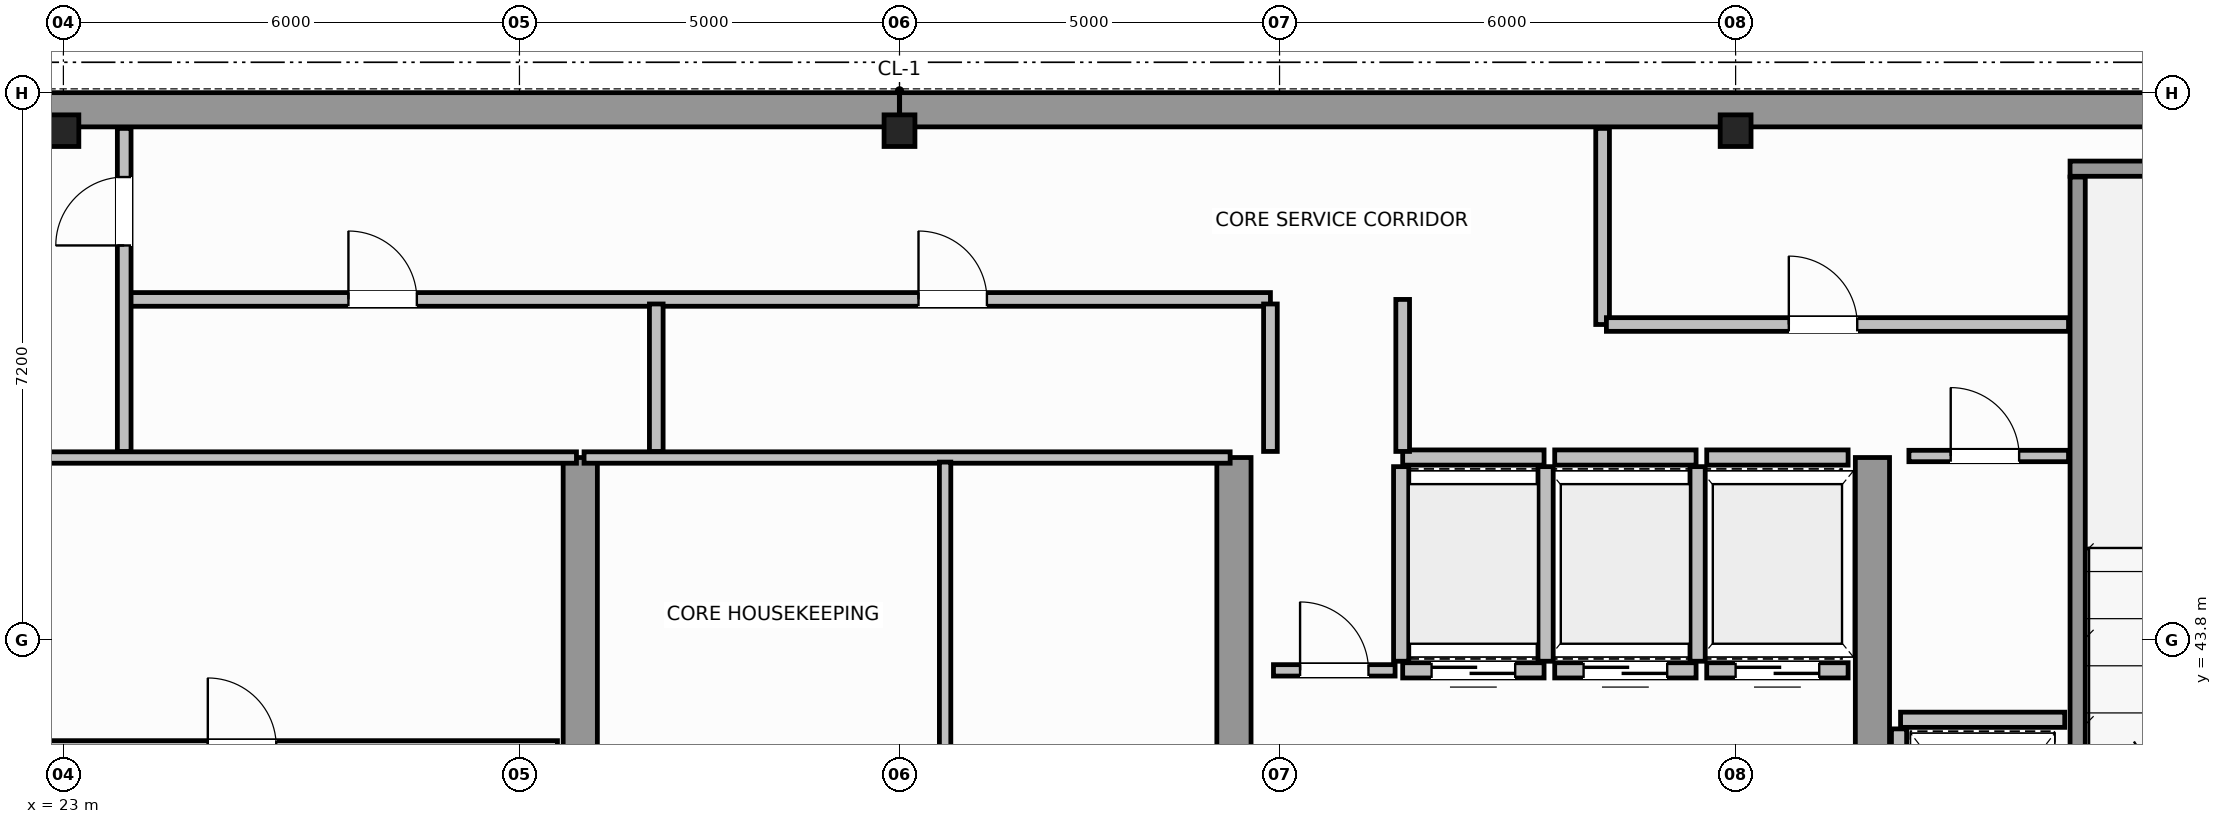
"""IFC4 building model, lengths in metres.
Left out: names, types, materials, properties, quantities, classifications, styles, units other than length and angle.
Written with IfcOpenShell. Run it as: python <this file> out.ifc"""

import sys

from ifc_helpers import new_model, si_unit, direction, frame, frame_2d, origin, origin_2d, place, context, subcontext, project, spatial, rectangle, i_section, extrude, source, transform, mapped, element, fill, save


model = new_model("IFC4")
c1 = context("Model", 3, precision=1e-05, world=origin(), true_north=direction((0.0, 1.0)))
c2 = subcontext(c1, "Body", "Model", "MODEL_VIEW")
j1 = project(units=[si_unit("LENGTHUNIT", "METRE"), si_unit("PLANEANGLEUNIT", "RADIAN")], contexts=[c1])
p1 = place(None, origin())
s1 = spatial("IfcSite", under=j1, at=p1, CompositionType="ELEMENT")
p2 = place(p1, origin())
s2 = spatial("IfcBuilding", under=s1, at=p2, CompositionType="ELEMENT")
p3 = place(p2, frame((0.0, 0.0, 276.4)))
s3 = spatial("IfcBuildingStorey", under=s2, at=p3, CompositionType="ELEMENT", Elevation=276.4)
m1 = source(origin(), c2, "Body", "SweptSolid", [
    extrude(i_section(OverallWidth=0.406, OverallDepth=0.416, WebThickness=0.03, FlangeThickness=0.042, FilletRadius=0.015, at=origin_2d()), origin(), (0.0, 0.0, 1.0), 3.8),
])
for number, where, z_axis, x_axis in (
    (1, (23.0, 50.5, 0.0), (0.0, 0.0, 1.0), (1.0, 0.0, 0.0)),
    (2, (34.0, 50.5, 0.0), (0.0, 0.0, 1.0), (1.0, 0.0, 0.0)),
    (3, (45.0, 50.5, 0.0), (0.0, 0.0, 1.0), (1.0, 0.0, 0.0)),
):
    element("IfcColumn", number, at=place(p3, frame(where, z_axis=z_axis, x_axis=x_axis)), inside=s3, PredefinedType="COLUMN", context=c2, shape_type="MappedRepresentation", body=[
        mapped(m1, transform((0.0, 0.0, 0.0), scale=1.0)),
    ])
for number, where, z_axis, x_axis in (
    (4, (14.229, 50.775, 0.0), (0.0, 0.0, 1.0), (1.0, 0.0, 0.0)),
    (5, (34.002, 50.775, 0.0), (0.0, 0.0, 1.0), (1.0, 0.0, 0.0)),
):
    element("IfcWall", number, at=place(p3, frame(where, z_axis=z_axis, x_axis=x_axis)), inside=s3, PredefinedType="SHEAR", context=c2, shape_type="SweptSolid", body=[
        extrude(rectangle(XDim=19.769, YDim=0.45, at=frame_2d((9.885, 0.0))), origin(), (0.0, 0.0, 1.0), 3.8),
    ])
for number, where, z_axis, x_axis in (
    (6, (29.8, 36.745, 0.0), (0.0, 0.0, 1.0), (0.0, 1.0, 0.0)),
    (7, (38.4, 36.745, 0.0), (0.0, 0.0, 1.0), (0.0, 1.0, 0.0)),
    (8, (46.8, 36.745, 0.0), (0.0, 0.0, 1.0), (0.0, 1.0, 0.0)),
):
    element("IfcWall", number, at=place(p3, frame(where, z_axis=z_axis, x_axis=x_axis)), inside=s3, PredefinedType="SHEAR", context=c2, shape_type="SweptSolid", body=[
        extrude(rectangle(XDim=9.455, YDim=0.45, at=frame_2d((4.728, 0.0))), origin(), (0.0, 0.0, 1.0), 3.8),
    ])
p4 = place(p3, frame((49.4, 50.0, 0.0), z_axis=(0.0, 0.0, 1.0), x_axis=(1.0, 0.0, 0.0)))
e9 = element("IfcWall", 9, at=p4, inside=s3, PredefinedType="SOLIDWALL", context=c2, shape_type="SweptSolid", body=[
    extrude(rectangle(XDim=4.375, YDim=0.2, at=frame_2d((2.188, 0.0))), origin(), (0.0, 0.0, 1.0), 3.8),
])
p5 = place(p3, frame((49.5, 39.96, 0.0), z_axis=(0.0, 0.0, 1.0), x_axis=(0.0, 1.0, 0.0)))
e10 = element("IfcWall", 10, at=p5, inside=s3, PredefinedType="SOLIDWALL", context=c2, shape_type="SweptSolid", body=[
    extrude(rectangle(XDim=9.93, YDim=0.2, at=frame_2d((4.965, 0.0))), origin(), (0.0, 0.0, 1.0), 3.8),
])
p6 = place(p3, frame((40.62, 43.4, 0.0), z_axis=(0.0, 0.0, 1.0), x_axis=(1.0, 0.0, 0.0)))
e11 = element("IfcWall", 11, at=p6, inside=s3, PredefinedType="SOLIDWALL", context=c2, shape_type="SweptSolid", body=[
    extrude(rectangle(XDim=1.86, YDim=0.2, at=frame_2d((0.93, 0.0))), origin(), (0.0, 0.0, 1.0), 3.58),
])
p7 = place(p6, frame((0.38, 0.0, 0.0)))
e12 = element("IfcOpeningElement", 12, at=p7, cuts=e11, PredefinedType="OPENING", context=c2, shape_type="SweptSolid", body=[
    extrude(rectangle(XDim=1.1, YDim=2.15, at=frame_2d((0.55, 1.075))), frame((0.0, 0.11, 0.0), z_axis=(0.0, -1.0, 0.0), x_axis=(1.0, 0.0, 0.0)), (0.0, 0.0, 1.0), 0.22),
])
p8 = place(p3, frame((40.62, 46.2, 0.0), z_axis=(0.0, 0.0, 1.0), x_axis=(1.0, 0.0, 0.0)))
e13 = element("IfcWall", 13, at=p8, inside=s3, PredefinedType="SOLIDWALL", context=c2, shape_type="SweptSolid", body=[
    extrude(rectangle(XDim=1.86, YDim=0.2, at=frame_2d((0.93, 0.0))), origin(), (0.0, 0.0, 1.0), 3.58),
])
for number, where, z_axis, x_axis in (
    (14, (40.6, 43.52, 0.0), (0.0, 0.0, 1.0), (0.0, 1.0, 0.0)),
    (15, (42.5, 43.52, 0.0), (0.0, 0.0, 1.0), (0.0, 1.0, 0.0)),
):
    element("IfcWall", number, at=place(p3, frame(where, z_axis=z_axis, x_axis=x_axis)), inside=s3, PredefinedType="SOLIDWALL", context=c2, shape_type="SweptSolid", body=[
        extrude(rectangle(XDim=2.56, YDim=0.2, at=frame_2d((1.28, 0.0))), origin(), (0.0, 0.0, 1.0), 3.58),
    ])
p9 = place(p3, frame((42.62, 43.4, 0.0), z_axis=(0.0, 0.0, 1.0), x_axis=(1.0, 0.0, 0.0)))
e16 = element("IfcWall", 16, at=p9, inside=s3, PredefinedType="SOLIDWALL", context=c2, shape_type="SweptSolid", body=[
    extrude(rectangle(XDim=1.86, YDim=0.2, at=frame_2d((0.93, 0.0))), origin(), (0.0, 0.0, 1.0), 3.58),
])
p10 = place(p9, frame((0.38, 0.0, 0.0)))
e17 = element("IfcOpeningElement", 17, at=p10, cuts=e16, PredefinedType="OPENING", context=c2, shape_type="SweptSolid", body=[
    extrude(rectangle(XDim=1.1, YDim=2.15, at=frame_2d((0.55, 1.075))), frame((0.0, 0.11, 0.0), z_axis=(0.0, -1.0, 0.0), x_axis=(1.0, 0.0, 0.0)), (0.0, 0.0, 1.0), 0.22),
])
p11 = place(p3, frame((42.62, 46.2, 0.0), z_axis=(0.0, 0.0, 1.0), x_axis=(1.0, 0.0, 0.0)))
e18 = element("IfcWall", 18, at=p11, inside=s3, PredefinedType="SOLIDWALL", context=c2, shape_type="SweptSolid", body=[
    extrude(rectangle(XDim=1.86, YDim=0.2, at=frame_2d((0.93, 0.0))), origin(), (0.0, 0.0, 1.0), 3.58),
])
p12 = place(p3, frame((44.5, 43.52, 0.0), z_axis=(0.0, 0.0, 1.0), x_axis=(0.0, 1.0, 0.0)))
e19 = element("IfcWall", 19, at=p12, inside=s3, PredefinedType="SOLIDWALL", context=c2, shape_type="SweptSolid", body=[
    extrude(rectangle(XDim=2.56, YDim=0.2, at=frame_2d((1.28, 0.0))), origin(), (0.0, 0.0, 1.0), 3.58),
])
p13 = place(p3, frame((44.62, 43.4, 0.0), z_axis=(0.0, 0.0, 1.0), x_axis=(1.0, 0.0, 0.0)))
e20 = element("IfcWall", 20, at=p13, inside=s3, PredefinedType="SOLIDWALL", context=c2, shape_type="SweptSolid", body=[
    extrude(rectangle(XDim=1.86, YDim=0.2, at=frame_2d((0.93, 0.0))), origin(), (0.0, 0.0, 1.0), 3.58),
])
p14 = place(p13, frame((0.38, 0.0, 0.0)))
e21 = element("IfcOpeningElement", 21, at=p14, cuts=e20, PredefinedType="OPENING", context=c2, shape_type="SweptSolid", body=[
    extrude(rectangle(XDim=1.1, YDim=2.15, at=frame_2d((0.55, 1.075))), frame((0.0, 0.11, 0.0), z_axis=(0.0, -1.0, 0.0), x_axis=(1.0, 0.0, 0.0)), (0.0, 0.0, 1.0), 0.22),
])
p15 = place(p3, frame((44.62, 46.2, 0.0), z_axis=(0.0, 0.0, 1.0), x_axis=(1.0, 0.0, 0.0)))
e22 = element("IfcWall", 22, at=p15, inside=s3, PredefinedType="SOLIDWALL", context=c2, shape_type="SweptSolid", body=[
    extrude(rectangle(XDim=1.86, YDim=0.2, at=frame_2d((0.93, 0.0))), origin(), (0.0, 0.0, 1.0), 3.58),
])
p16 = place(p3, frame((47.17, 42.75, 0.0), z_axis=(0.0, 0.0, 1.0), x_axis=(1.0, 0.0, 0.0)))
e23 = element("IfcWall", 23, at=p16, inside=s3, PredefinedType="SOLIDWALL", context=c2, shape_type="SweptSolid", body=[
    extrude(rectangle(XDim=2.16, YDim=0.2, at=frame_2d((1.08, 0.0))), origin(), (0.0, 0.0, 1.0), 3.58),
])
p17 = place(p3, frame((47.15, 40.07, 0.0), z_axis=(0.0, 0.0, 1.0), x_axis=(0.0, 1.0, 0.0)))
e24 = element("IfcWall", 24, at=p17, inside=s3, PredefinedType="SOLIDWALL", context=c2, shape_type="SweptSolid", body=[
    extrude(rectangle(XDim=2.56, YDim=0.2, at=frame_2d((1.28, 0.0))), origin(), (0.0, 0.0, 1.0), 3.58),
])
p18 = place(p3, frame((21.25, 46.2, 0.0), z_axis=(0.0, 0.0, 1.0), x_axis=(1.0, 0.0, 0.0)))
e25 = element("IfcWall", 25, at=p18, inside=s3, PredefinedType="PARTITIONING", context=c2, shape_type="SweptSolid", body=[
    extrude(rectangle(XDim=8.5, YDim=0.15, at=frame_2d((4.25, 0.0))), origin(), (0.0, 0.0, 1.0), 3.58),
])
p19 = place(p3, frame((21.5, 42.4, 0.0), z_axis=(0.0, 0.0, 1.0), x_axis=(1.0, 0.0, 0.0)))
e26 = element("IfcWall", 26, at=p19, inside=s3, PredefinedType="PARTITIONING", context=c2, shape_type="SweptSolid", body=[
    extrude(rectangle(XDim=8.0, YDim=0.15, at=frame_2d((4.0, 0.0))), origin(), (0.0, 0.0, 1.0), 3.58),
])
p20 = place(p19, frame((3.4, 0.0, 0.0)))
e27 = element("IfcOpeningElement", 27, at=p20, cuts=e26, PredefinedType="OPENING", context=c2, shape_type="SweptSolid", body=[
    extrude(rectangle(XDim=0.9, YDim=2.1, at=frame_2d((0.45, 1.05))), frame((0.0, 0.085, 0.0), z_axis=(0.0, -1.0, 0.0), x_axis=(1.0, 0.0, 0.0)), (0.0, 0.0, 1.0), 0.17),
])
p21 = place(p3, frame((29.85, 46.2, 0.0), z_axis=(0.0, 0.0, 1.0), x_axis=(1.0, 0.0, 0.0)))
e28 = element("IfcWall", 28, at=p21, inside=s3, PredefinedType="PARTITIONING", context=c2, shape_type="SweptSolid", body=[
    extrude(rectangle(XDim=8.5, YDim=0.15, at=frame_2d((4.25, 0.0))), origin(), (0.0, 0.0, 1.0), 3.58),
])
p22 = place(p3, frame((34.6, 36.56, 0.0), z_axis=(0.0, 0.0, 1.0), x_axis=(0.0, 1.0, 0.0)))
e29 = element("IfcWall", 29, at=p22, inside=s3, PredefinedType="PARTITIONING", context=c2, shape_type="SweptSolid", body=[
    extrude(rectangle(XDim=9.58, YDim=0.15, at=frame_2d((4.79, 0.0))), origin(), (0.0, 0.0, 1.0), 3.58),
])
p23 = place(p22, frame((4.2, 0.0, 0.0)))
e30 = element("IfcOpeningElement", 30, at=p23, cuts=e29, PredefinedType="OPENING", context=c2, shape_type="SweptSolid", body=[
    extrude(rectangle(XDim=0.9, YDim=2.1, at=frame_2d((0.45, 1.05))), frame((0.0, 0.085, 0.0), z_axis=(0.0, -1.0, 0.0), x_axis=(1.0, 0.0, 0.0)), (0.0, 0.0, 1.0), 0.17),
])
p24 = place(p3, frame((47.28, 46.22, 0.0), z_axis=(0.0, 0.0, 1.0), x_axis=(1.0, 0.0, 0.0)))
e31 = element("IfcWall", 31, at=p24, inside=s3, PredefinedType="PARTITIONING", context=c2, shape_type="SweptSolid", body=[
    extrude(rectangle(XDim=2.1, YDim=0.15, at=frame_2d((1.05, 0.0))), origin(), (0.0, 0.0, 1.0), 3.58),
])
p25 = place(p24, frame((0.55, 0.0, 0.0)))
e32 = element("IfcOpeningElement", 32, at=p25, cuts=e31, PredefinedType="OPENING", context=c2, shape_type="SweptSolid", body=[
    extrude(rectangle(XDim=0.9, YDim=2.1, at=frame_2d((0.45, 1.05))), frame((0.0, 0.085, 0.0), z_axis=(0.0, -1.0, 0.0), x_axis=(1.0, 0.0, 0.0)), (0.0, 0.0, 1.0), 0.17),
])
p26 = place(p3, frame((38.92, 43.4, 0.0), z_axis=(0.0, 0.0, 1.0), x_axis=(1.0, 0.0, 0.0)))
e33 = element("IfcWall", 33, at=p26, inside=s3, PredefinedType="PARTITIONING", context=c2, shape_type="SweptSolid", body=[
    extrude(rectangle(XDim=1.6, YDim=0.15, at=frame_2d((0.8, 0.0))), origin(), (0.0, 0.0, 1.0), 3.58),
])
p27 = place(p26, frame((0.35, 0.0, 0.0)))
e34 = element("IfcOpeningElement", 34, at=p27, cuts=e33, PredefinedType="OPENING", context=c2, shape_type="SweptSolid", body=[
    extrude(rectangle(XDim=0.9, YDim=2.1, at=frame_2d((0.45, 1.05))), frame((0.0, 0.085, 0.0), z_axis=(0.0, -1.0, 0.0), x_axis=(1.0, 0.0, 0.0)), (0.0, 0.0, 1.0), 0.17),
])
p28 = place(p3, frame((23.85, 48.28, 0.0), z_axis=(0.0, 0.0, 1.0), x_axis=(1.0, 0.0, 0.0)))
e35 = element("IfcWall", 35, at=p28, inside=s3, PredefinedType="PLUMBINGWALL", context=c2, shape_type="SweptSolid", body=[
    extrude(rectangle(XDim=15.03, YDim=0.18, at=frame_2d((7.515, 0.0))), origin(), (0.0, 0.0, 1.0), 3.58),
])
p29 = place(p28, frame((2.9, 0.0, 0.0)))
e36 = element("IfcOpeningElement", 36, at=p29, cuts=e35, PredefinedType="OPENING", context=c2, shape_type="SweptSolid", body=[
    extrude(rectangle(XDim=0.9, YDim=2.15, at=frame_2d((0.45, 1.075))), frame((0.0, 0.1, 0.0), z_axis=(0.0, -1.0, 0.0), x_axis=(1.0, 0.0, 0.0)), (0.0, 0.0, 1.0), 0.2),
])
p30 = place(p28, frame((10.4, 0.0, 0.0)))
e37 = element("IfcOpeningElement", 37, at=p30, cuts=e35, PredefinedType="OPENING", context=c2, shape_type="SweptSolid", body=[
    extrude(rectangle(XDim=0.9, YDim=2.15, at=frame_2d((0.45, 1.075))), frame((0.0, 0.1, 0.0), z_axis=(0.0, -1.0, 0.0), x_axis=(1.0, 0.0, 0.0)), (0.0, 0.0, 1.0), 0.2),
])
p31 = place(p3, frame((23.8, 46.28, 0.0), z_axis=(0.0, 0.0, 1.0), x_axis=(0.0, 1.0, 0.0)))
e38 = element("IfcWall", 38, at=p31, inside=s3, PredefinedType="PLUMBINGWALL", context=c2, shape_type="SweptSolid", body=[
    extrude(rectangle(XDim=4.25, YDim=0.18, at=frame_2d((2.125, 0.0))), origin(), (0.0, 0.0, 1.0), 3.58),
])
p32 = place(p31, frame((2.71, 0.0, 0.0)))
e39 = element("IfcOpeningElement", 39, at=p32, cuts=e38, PredefinedType="OPENING", context=c2, shape_type="SweptSolid", body=[
    extrude(rectangle(XDim=0.9, YDim=2.15, at=frame_2d((0.45, 1.075))), frame((0.0, 0.1, 0.0), z_axis=(0.0, -1.0, 0.0), x_axis=(1.0, 0.0, 0.0)), (0.0, 0.0, 1.0), 0.2),
])
for number, where, z_axis, x_axis in (
    (40, (30.8, 46.28, 0.0), (0.0, 0.0, 1.0), (0.0, 1.0, 0.0)),
    (41, (38.88, 46.28, 0.0), (0.0, 0.0, 1.0), (0.0, 1.0, 0.0)),
):
    element("IfcWall", number, at=place(p3, frame(where, z_axis=z_axis, x_axis=x_axis)), inside=s3, PredefinedType="PLUMBINGWALL", context=c2, shape_type="SweptSolid", body=[
        extrude(rectangle(XDim=1.94, YDim=0.18, at=frame_2d((0.97, 0.0))), origin(), (0.0, 0.0, 1.0), 3.58),
    ])
p33 = place(p3, frame((40.62, 46.28, 0.0), z_axis=(0.0, 0.0, 1.0), x_axis=(0.0, 1.0, 0.0)))
e42 = element("IfcWall", 42, at=p33, inside=s3, PredefinedType="PLUMBINGWALL", context=c2, shape_type="SweptSolid", body=[
    extrude(rectangle(XDim=2.0, YDim=0.18, at=frame_2d((1.0, 0.0))), origin(), (0.0, 0.0, 1.0), 3.58),
])
p34 = place(p3, frame((43.25, 47.95, 0.0), z_axis=(0.0, 0.0, 1.0), x_axis=(0.0, 1.0, 0.0)))
e43 = element("IfcWall", 43, at=p34, inside=s3, PredefinedType="PLUMBINGWALL", context=c2, shape_type="SweptSolid", body=[
    extrude(rectangle(XDim=2.58, YDim=0.18, at=frame_2d((1.29, 0.0))), origin(), (0.0, 0.0, 1.0), 3.58),
])
p35 = place(p3, frame((43.3, 47.95, 0.0), z_axis=(0.0, 0.0, 1.0), x_axis=(1.0, 0.0, 0.0)))
e44 = element("IfcWall", 44, at=p35, inside=s3, PredefinedType="PLUMBINGWALL", context=c2, shape_type="SweptSolid", body=[
    extrude(rectangle(XDim=6.08, YDim=0.18, at=frame_2d((3.04, 0.0))), origin(), (0.0, 0.0, 1.0), 3.58),
])
p36 = place(p35, frame((2.4, 0.0, 0.0)))
e45 = element("IfcOpeningElement", 45, at=p36, cuts=e44, PredefinedType="OPENING", context=c2, shape_type="SweptSolid", body=[
    extrude(rectangle(XDim=0.9, YDim=2.15, at=frame_2d((0.45, 1.075))), frame((0.0, 0.1, 0.0), z_axis=(0.0, -1.0, 0.0), x_axis=(1.0, 0.0, 0.0)), (0.0, 0.0, 1.0), 0.2),
])
m2 = source(origin(), c2, "Body", "SweptSolid", [
    extrude(rectangle(XDim=1.1, YDim=2.15, at=frame_2d((0.55, 1.075))), frame((0.0, 0.025, 0.0), z_axis=(0.0, -1.0, 0.0), x_axis=(1.0, 0.0, 0.0)), (0.0, 0.0, 1.0), 0.05),
])
p37 = place(p7, origin())
e46 = element("IfcDoor", 46, at=p37, inside=s3, OperationType="DOUBLE_DOOR_SLIDING", PredefinedType="DOOR", context=c2, shape_type="MappedRepresentation", body=[
    mapped(m2, transform((0.0, 0.0, 0.0), scale=1.0)),
])
fill(e12, e46)
p38 = place(p10, origin())
e47 = element("IfcDoor", 47, at=p38, inside=s3, OperationType="DOUBLE_DOOR_SLIDING", PredefinedType="DOOR", context=c2, shape_type="MappedRepresentation", body=[
    mapped(m2, transform((0.0, 0.0, 0.0), scale=1.0)),
])
fill(e17, e47)
p39 = place(p14, origin())
e48 = element("IfcDoor", 48, at=p39, inside=s3, OperationType="DOUBLE_DOOR_SLIDING", PredefinedType="DOOR", context=c2, shape_type="MappedRepresentation", body=[
    mapped(m2, transform((0.0, 0.0, 0.0), scale=1.0)),
])
fill(e21, e48)
m3 = source(origin(), c2, "Body", "SweptSolid", [
    extrude(rectangle(XDim=0.9, YDim=2.1, at=frame_2d((0.45, 1.05))), frame((0.0, 0.025, 0.0), z_axis=(0.0, -1.0, 0.0), x_axis=(1.0, 0.0, 0.0)), (0.0, 0.0, 1.0), 0.05),
])
p40 = place(p20, origin())
e49 = element("IfcDoor", 49, at=p40, inside=s3, OperationType="SINGLE_SWING_RIGHT", PredefinedType="DOOR", context=c2, shape_type="MappedRepresentation", body=[
    mapped(m3, transform((0.0, 0.0, 0.0), scale=1.0)),
])
fill(e27, e49)
p41 = place(p25, origin())
e50 = element("IfcDoor", 50, at=p41, inside=s3, OperationType="SINGLE_SWING_RIGHT", PredefinedType="DOOR", context=c2, shape_type="MappedRepresentation", body=[
    mapped(m3, transform((0.0, 0.0, 0.0), scale=1.0)),
])
fill(e32, e50)
p42 = place(p27, origin())
e51 = element("IfcDoor", 51, at=p42, inside=s3, OperationType="SINGLE_SWING_LEFT", PredefinedType="DOOR", context=c2, shape_type="MappedRepresentation", body=[
    mapped(m3, transform((0.0, 0.0, 0.0), scale=1.0)),
])
fill(e34, e51)
m4 = source(origin(), c2, "Body", "SweptSolid", [
    extrude(rectangle(XDim=0.9, YDim=2.15, at=frame_2d((0.45, 1.075))), frame((0.0, 0.025, 0.0), z_axis=(0.0, -1.0, 0.0), x_axis=(1.0, 0.0, 0.0)), (0.0, 0.0, 1.0), 0.05),
])
p43 = place(p32, origin())
e52 = element("IfcDoor", 52, at=p43, inside=s3, OperationType="SINGLE_SWING_LEFT", PredefinedType="DOOR", context=c2, shape_type="MappedRepresentation", body=[
    mapped(m4, transform((0.0, 0.0, 0.0), scale=1.0)),
])
fill(e39, e52)
p44 = place(p29, origin())
e53 = element("IfcDoor", 53, at=p44, inside=s3, OperationType="SINGLE_SWING_RIGHT", PredefinedType="DOOR", context=c2, shape_type="MappedRepresentation", body=[
    mapped(m4, transform((0.0, 0.0, 0.0), scale=1.0)),
])
fill(e36, e53)
p45 = place(p30, origin())
e54 = element("IfcDoor", 54, at=p45, inside=s3, OperationType="SINGLE_SWING_LEFT", PredefinedType="DOOR", context=c2, shape_type="MappedRepresentation", body=[
    mapped(m4, transform((0.0, 0.0, 0.0), scale=1.0)),
])
fill(e37, e54)
p46 = place(p36, origin())
e55 = element("IfcDoor", 55, at=p46, inside=s3, OperationType="SINGLE_SWING_RIGHT", PredefinedType="DOOR", context=c2, shape_type="MappedRepresentation", body=[
    mapped(m4, transform((0.0, 0.0, 0.0), scale=1.0)),
])
fill(e45, e55)
save(model, sys.argv[1])
